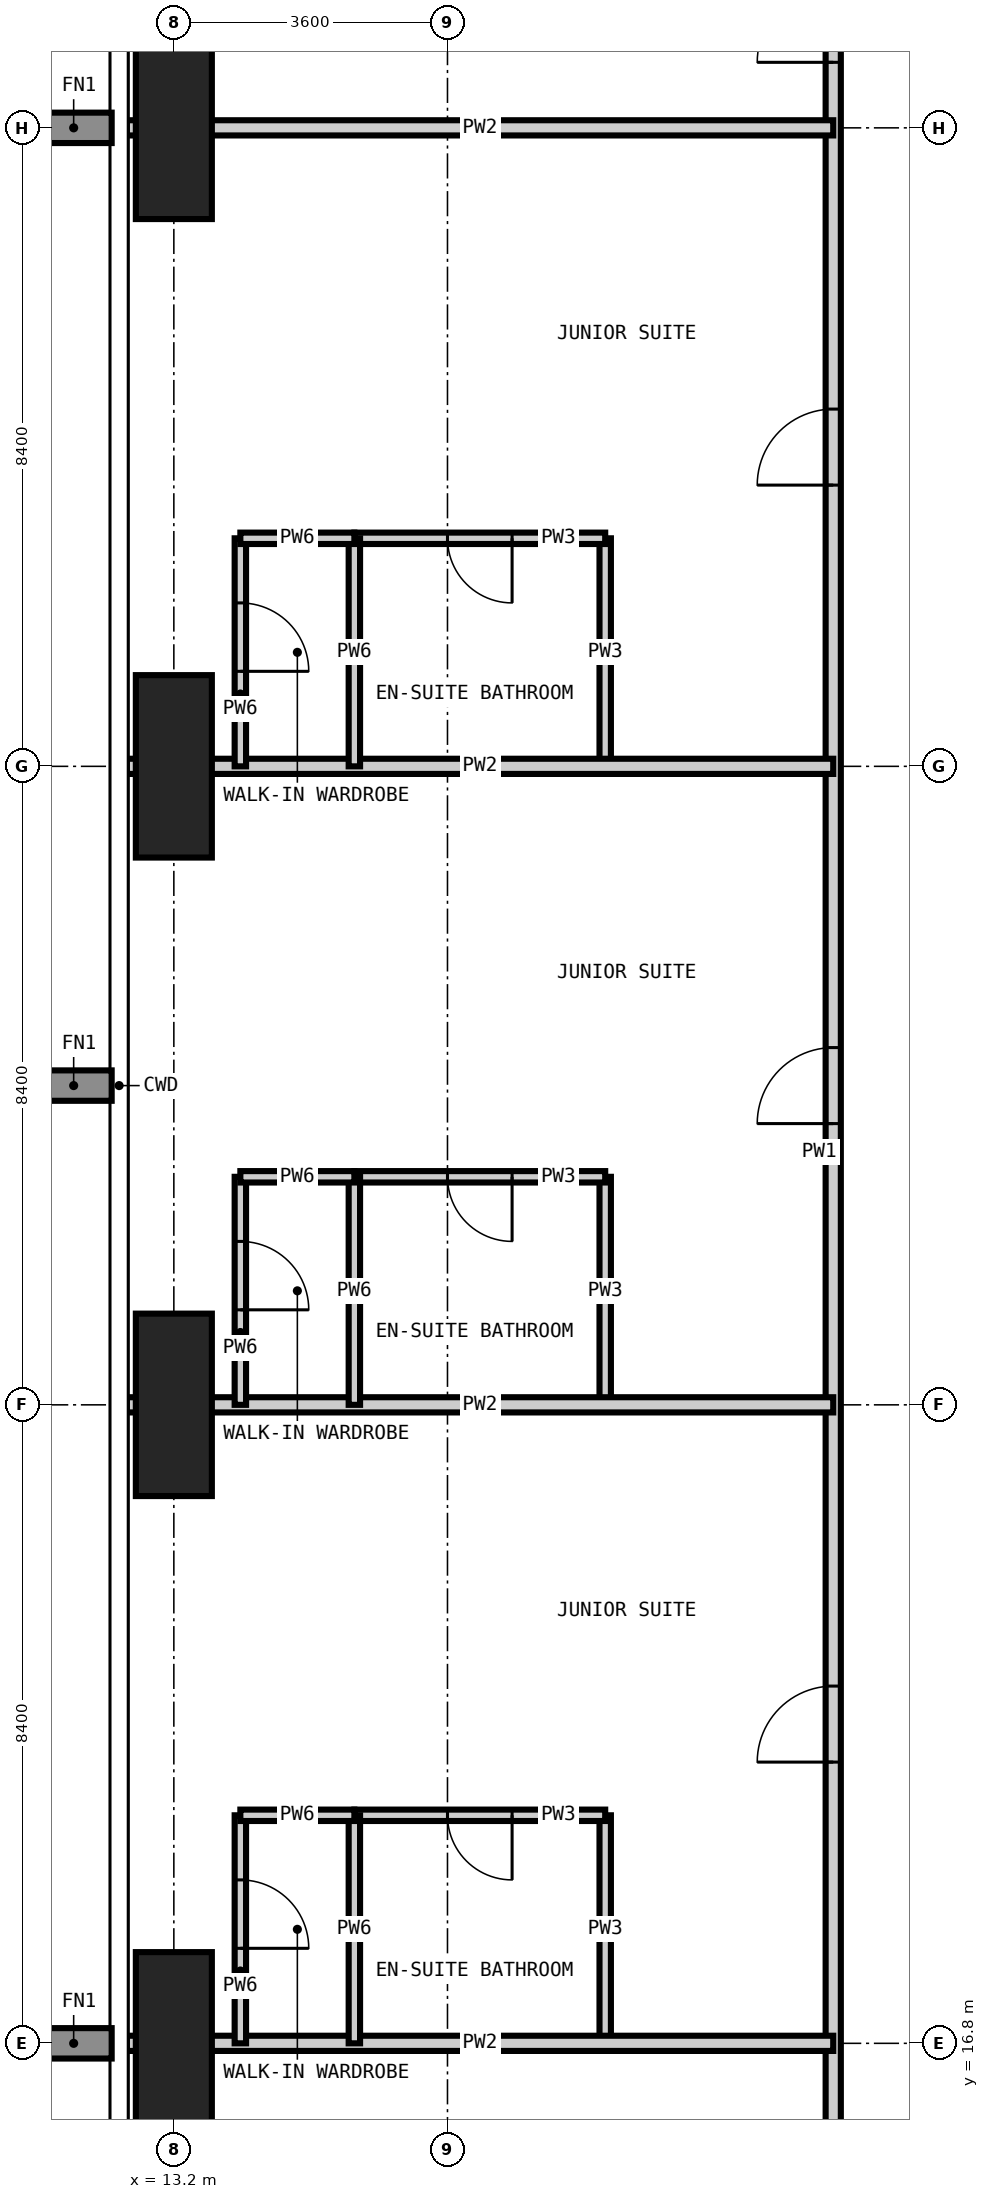
"""IFC4 building model, lengths in metres.
Left out: names, types, materials, properties, quantities, classifications, styles, units other than length and angle.
Written with IfcOpenShell. Run it as: python <this file> out.ifc"""

import sys

from ifc_helpers import new_model, si_unit, direction, frame, frame_2d, origin, origin_2d, place, context, subcontext, project, spatial, rectangle, extrude, element, fill, save


model = new_model("IFC4")
c1 = context("Model", 3, precision=1e-05, world=origin(), true_north=direction((0.0, 1.0)))
c2 = subcontext(c1, "Body", "Model", "MODEL_VIEW")
j1 = project(units=[si_unit("LENGTHUNIT", "METRE"), si_unit("PLANEANGLEUNIT", "RADIAN")], contexts=[c1])
p1 = place(None, origin())
s1 = spatial("IfcSite", under=j1, at=p1, CompositionType="ELEMENT")
p2 = place(p1, origin())
s2 = spatial("IfcBuilding", under=s1, at=p2, CompositionType="ELEMENT")
p3 = place(p2, frame((0.0, 0.0, 241.2)))
s3 = spatial("IfcBuildingStorey", under=s2, at=p3, CompositionType="ELEMENT", Elevation=241.2)
for number, where, z_axis, x_axis in (
    (1, (13.2, 16.8, -0.35), (0.0, 0.0, 1.0), (1.0, 0.0, 0.0)),
    (2, (13.2, 25.2, -0.35), (0.0, 0.0, 1.0), (1.0, 0.0, 0.0)),
    (3, (13.2, 33.6, -0.35), (0.0, 0.0, 1.0), (1.0, 0.0, 0.0)),
    (4, (13.2, 42.0, -0.35), (0.0, 0.0, 1.0), (1.0, 0.0, 0.0)),
):
    element("IfcColumn", number, at=place(p3, frame(where, z_axis=z_axis, x_axis=x_axis)), inside=s3, PredefinedType="COLUMN", context=c2, shape_type="SweptSolid", body=[
        extrude(rectangle(XDim=1.0, YDim=2.4, at=origin_2d()), origin(), (0.0, 0.0, 1.0), 3.9),
    ])
for number, where, z_axis, x_axis in (
    (5, (18.875, 16.8, 0.0), (0.0, 0.0, 1.0), (0.0, 1.0, 0.0)),
    (6, (18.875, 25.2, 0.0), (0.0, 0.0, 1.0), (0.0, 1.0, 0.0)),
    (7, (18.875, 33.6, 0.0), (0.0, 0.0, 1.0), (0.0, 1.0, 0.0)),
):
    element("IfcWall", number, at=place(p3, frame(where, z_axis=z_axis, x_axis=x_axis)), inside=s3, PredefinedType="PARTITIONING", context=c2, shape_type="SweptSolid", body=[
        extrude(rectangle(XDim=3.0, YDim=0.15, at=frame_2d((1.5, 0.0))), origin(), (0.0, 0.0, 1.0), 3.55),
    ])
p4 = place(p3, frame((15.575, 19.8, 0.0), z_axis=(0.0, 0.0, 1.0), x_axis=(1.0, 0.0, 0.0)))
e8 = element("IfcWall", 8, at=p4, inside=s3, PredefinedType="PARTITIONING", context=c2, shape_type="SweptSolid", body=[
    extrude(rectangle(XDim=3.3, YDim=0.15, at=frame_2d((1.65, 0.0))), origin(), (0.0, 0.0, 1.0), 3.55),
])
p5 = place(p4, frame((1.225, 0.0, 0.0)))
e9 = element("IfcOpeningElement", 9, at=p5, cuts=e8, PredefinedType="OPENING", context=c2, shape_type="SweptSolid", body=[
    extrude(rectangle(XDim=0.85, YDim=2.1, at=frame_2d((0.425, 1.05))), frame((0.0, 0.085, 0.0), z_axis=(0.0, -1.0, 0.0), x_axis=(1.0, 0.0, 0.0)), (0.0, 0.0, 1.0), 0.17),
])
p6 = place(p3, frame((15.575, 28.2, 0.0), z_axis=(0.0, 0.0, 1.0), x_axis=(1.0, 0.0, 0.0)))
e10 = element("IfcWall", 10, at=p6, inside=s3, PredefinedType="PARTITIONING", context=c2, shape_type="SweptSolid", body=[
    extrude(rectangle(XDim=3.3, YDim=0.15, at=frame_2d((1.65, 0.0))), origin(), (0.0, 0.0, 1.0), 3.55),
])
p7 = place(p6, frame((1.225, 0.0, 0.0)))
e11 = element("IfcOpeningElement", 11, at=p7, cuts=e10, PredefinedType="OPENING", context=c2, shape_type="SweptSolid", body=[
    extrude(rectangle(XDim=0.85, YDim=2.1, at=frame_2d((0.425, 1.05))), frame((0.0, 0.085, 0.0), z_axis=(0.0, -1.0, 0.0), x_axis=(1.0, 0.0, 0.0)), (0.0, 0.0, 1.0), 0.17),
])
p8 = place(p3, frame((15.575, 36.6, 0.0), z_axis=(0.0, 0.0, 1.0), x_axis=(1.0, 0.0, 0.0)))
e12 = element("IfcWall", 12, at=p8, inside=s3, PredefinedType="PARTITIONING", context=c2, shape_type="SweptSolid", body=[
    extrude(rectangle(XDim=3.3, YDim=0.15, at=frame_2d((1.65, 0.0))), origin(), (0.0, 0.0, 1.0), 3.55),
])
p9 = place(p8, frame((1.225, 0.0, 0.0)))
e13 = element("IfcOpeningElement", 13, at=p9, cuts=e12, PredefinedType="OPENING", context=c2, shape_type="SweptSolid", body=[
    extrude(rectangle(XDim=0.85, YDim=2.1, at=frame_2d((0.425, 1.05))), frame((0.0, 0.085, 0.0), z_axis=(0.0, -1.0, 0.0), x_axis=(1.0, 0.0, 0.0)), (0.0, 0.0, 1.0), 0.17),
])
p10 = place(p3, frame((21.875, 13.475, 0.0), z_axis=(0.0, 0.0, 1.0), x_axis=(0.0, 1.0, 0.0)))
e14 = element("IfcWall", 14, at=p10, inside=s3, PredefinedType="PARTITIONING", context=c2, shape_type="SweptSolid", body=[
    extrude(rectangle(XDim=31.25, YDim=0.2, at=frame_2d((15.625, 0.0))), origin(), (0.0, 0.0, 1.0), 3.55),
])
p11 = place(p10, frame((7.025, 0.0, 0.0)))
e15 = element("IfcOpeningElement", 15, at=p11, cuts=e14, PredefinedType="OPENING", context=c2, shape_type="SweptSolid", body=[
    extrude(rectangle(XDim=1.0, YDim=2.2, at=frame_2d((0.5, 1.1))), frame((0.0, 0.11, 0.0), z_axis=(0.0, -1.0, 0.0), x_axis=(1.0, 0.0, 0.0)), (0.0, 0.0, 1.0), 0.22),
])
p12 = place(p10, frame((15.425, 0.0, 0.0)))
e16 = element("IfcOpeningElement", 16, at=p12, cuts=e14, PredefinedType="OPENING", context=c2, shape_type="SweptSolid", body=[
    extrude(rectangle(XDim=1.0, YDim=2.2, at=frame_2d((0.5, 1.1))), frame((0.0, 0.11, 0.0), z_axis=(0.0, -1.0, 0.0), x_axis=(1.0, 0.0, 0.0)), (0.0, 0.0, 1.0), 0.22),
])
p13 = place(p10, frame((23.825, 0.0, 0.0)))
e17 = element("IfcOpeningElement", 17, at=p13, cuts=e14, PredefinedType="OPENING", context=c2, shape_type="SweptSolid", body=[
    extrude(rectangle(XDim=1.0, YDim=2.2, at=frame_2d((0.5, 1.1))), frame((0.0, 0.11, 0.0), z_axis=(0.0, -1.0, 0.0), x_axis=(1.0, 0.0, 0.0)), (0.0, 0.0, 1.0), 0.22),
])
p14 = place(p10, frame((1.162, 0.0, 0.0)))
e18 = element("IfcOpeningElement", 18, at=p14, cuts=e14, PredefinedType="OPENING", context=c2, shape_type="SweptSolid", body=[
    extrude(rectangle(XDim=1.0, YDim=2.2, at=frame_2d((0.5, 1.1))), frame((0.0, 0.11, 0.0), z_axis=(0.0, -1.0, 0.0), x_axis=(1.0, 0.0, 0.0)), (0.0, 0.0, 1.0), 0.22),
])
p15 = place(p10, frame((29.387, 0.0, 0.0)))
e19 = element("IfcOpeningElement", 19, at=p15, cuts=e14, PredefinedType="OPENING", context=c2, shape_type="SweptSolid", body=[
    extrude(rectangle(XDim=1.0, YDim=2.2, at=frame_2d((0.5, 1.1))), frame((0.0, 0.11, 0.0), z_axis=(0.0, -1.0, 0.0), x_axis=(1.0, 0.0, 0.0)), (0.0, 0.0, 1.0), 0.22),
])
for number, where, z_axis, x_axis in (
    (20, (12.582, 16.8, 0.0), (0.0, 0.0, 1.0), (1.0, 0.0, 0.0)),
    (21, (12.582, 25.2, 0.0), (0.0, 0.0, 1.0), (1.0, 0.0, 0.0)),
    (22, (12.582, 33.6, 0.0), (0.0, 0.0, 1.0), (1.0, 0.0, 0.0)),
    (23, (12.582, 42.0, 0.0), (0.0, 0.0, 1.0), (1.0, 0.0, 0.0)),
):
    element("IfcWall", number, at=place(p3, frame(where, z_axis=z_axis, x_axis=x_axis)), inside=s3, PredefinedType="PARTITIONING", context=c2, shape_type="SweptSolid", body=[
        extrude(rectangle(XDim=9.293, YDim=0.2, at=frame_2d((4.646, 0.0))), origin(), (0.0, 0.0, 1.0), 3.55),
    ])
p16 = place(p3, frame((14.075, 16.8, 0.0), z_axis=(0.0, 0.0, 1.0), x_axis=(0.0, 1.0, 0.0)))
e24 = element("IfcWall", 24, at=p16, inside=s3, PredefinedType="PARTITIONING", context=c2, shape_type="SweptSolid", body=[
    extrude(rectangle(XDim=3.0, YDim=0.15, at=frame_2d((1.5, 0.0))), origin(), (0.0, 0.0, 1.0), 3.55),
])
p17 = place(p16, frame((1.25, 0.0, 0.0)))
e25 = element("IfcOpeningElement", 25, at=p17, cuts=e24, PredefinedType="OPENING", context=c2, shape_type="SweptSolid", body=[
    extrude(rectangle(XDim=0.9, YDim=2.1, at=frame_2d((0.45, 1.05))), frame((0.0, 0.085, 0.0), z_axis=(0.0, -1.0, 0.0), x_axis=(1.0, 0.0, 0.0)), (0.0, 0.0, 1.0), 0.17),
])
p18 = place(p3, frame((14.075, 25.2, 0.0), z_axis=(0.0, 0.0, 1.0), x_axis=(0.0, 1.0, 0.0)))
e26 = element("IfcWall", 26, at=p18, inside=s3, PredefinedType="PARTITIONING", context=c2, shape_type="SweptSolid", body=[
    extrude(rectangle(XDim=3.0, YDim=0.15, at=frame_2d((1.5, 0.0))), origin(), (0.0, 0.0, 1.0), 3.55),
])
p19 = place(p18, frame((1.25, 0.0, 0.0)))
e27 = element("IfcOpeningElement", 27, at=p19, cuts=e26, PredefinedType="OPENING", context=c2, shape_type="SweptSolid", body=[
    extrude(rectangle(XDim=0.9, YDim=2.1, at=frame_2d((0.45, 1.05))), frame((0.0, 0.085, 0.0), z_axis=(0.0, -1.0, 0.0), x_axis=(1.0, 0.0, 0.0)), (0.0, 0.0, 1.0), 0.17),
])
p20 = place(p3, frame((14.075, 33.6, 0.0), z_axis=(0.0, 0.0, 1.0), x_axis=(0.0, 1.0, 0.0)))
e28 = element("IfcWall", 28, at=p20, inside=s3, PredefinedType="PARTITIONING", context=c2, shape_type="SweptSolid", body=[
    extrude(rectangle(XDim=3.0, YDim=0.15, at=frame_2d((1.5, 0.0))), origin(), (0.0, 0.0, 1.0), 3.55),
])
p21 = place(p20, frame((1.25, 0.0, 0.0)))
e29 = element("IfcOpeningElement", 29, at=p21, cuts=e28, PredefinedType="OPENING", context=c2, shape_type="SweptSolid", body=[
    extrude(rectangle(XDim=0.9, YDim=2.1, at=frame_2d((0.45, 1.05))), frame((0.0, 0.085, 0.0), z_axis=(0.0, -1.0, 0.0), x_axis=(1.0, 0.0, 0.0)), (0.0, 0.0, 1.0), 0.17),
])
for number, where, z_axis, x_axis in (
    (30, (15.575, 16.8, 0.0), (0.0, 0.0, 1.0), (0.0, 1.0, 0.0)),
    (31, (15.575, 25.2, 0.0), (0.0, 0.0, 1.0), (0.0, 1.0, 0.0)),
    (32, (15.575, 33.6, 0.0), (0.0, 0.0, 1.0), (0.0, 1.0, 0.0)),
):
    element("IfcWall", number, at=place(p3, frame(where, z_axis=z_axis, x_axis=x_axis)), inside=s3, PredefinedType="PARTITIONING", context=c2, shape_type="SweptSolid", body=[
        extrude(rectangle(XDim=3.0, YDim=0.15, at=frame_2d((1.5, 0.0))), origin(), (0.0, 0.0, 1.0), 3.55),
    ])
for number, where, z_axis, x_axis in (
    (33, (14.075, 19.8, 0.0), (0.0, 0.0, 1.0), (1.0, 0.0, 0.0)),
    (34, (14.075, 28.2, 0.0), (0.0, 0.0, 1.0), (1.0, 0.0, 0.0)),
    (35, (14.075, 36.6, 0.0), (0.0, 0.0, 1.0), (1.0, 0.0, 0.0)),
):
    element("IfcWall", number, at=place(p3, frame(where, z_axis=z_axis, x_axis=x_axis)), inside=s3, PredefinedType="PARTITIONING", context=c2, shape_type="SweptSolid", body=[
        extrude(rectangle(XDim=1.5, YDim=0.15, at=frame_2d((0.75, 0.0))), origin(), (0.0, 0.0, 1.0), 3.55),
    ])
p22 = place(p11, origin())
e36 = element("IfcDoor", 36, at=p22, inside=s3, OperationType="SINGLE_SWING_LEFT", PredefinedType="DOOR", context=c2, shape_type="SweptSolid", body=[
    extrude(rectangle(XDim=1.0, YDim=2.2, at=frame_2d((0.5, 1.1))), frame((0.0, 0.025, 0.0), z_axis=(0.0, -1.0, 0.0), x_axis=(1.0, 0.0, 0.0)), (0.0, 0.0, 1.0), 0.05),
])
fill(e15, e36)
p23 = place(p5, frame((0.85, 0.0, 0.0), z_axis=(0.0, 0.0, 1.0), x_axis=(-1.0, 0.0, 0.0)))
e37 = element("IfcDoor", 37, at=p23, inside=s3, OperationType="SINGLE_SWING_LEFT", PredefinedType="DOOR", context=c2, shape_type="SweptSolid", body=[
    extrude(rectangle(XDim=0.85, YDim=2.1, at=frame_2d((0.425, 1.05))), frame((0.0, 0.025, 0.0), z_axis=(0.0, -1.0, 0.0), x_axis=(1.0, 0.0, 0.0)), (0.0, 0.0, 1.0), 0.05),
])
fill(e9, e37)
p24 = place(p17, frame((0.9, 0.0, 0.0), z_axis=(0.0, 0.0, 1.0), x_axis=(-1.0, 0.0, 0.0)))
e38 = element("IfcDoor", 38, at=p24, inside=s3, OperationType="SINGLE_SWING_RIGHT", PredefinedType="DOOR", context=c2, shape_type="SweptSolid", body=[
    extrude(rectangle(XDim=0.9, YDim=2.1, at=frame_2d((0.45, 1.05))), frame((0.0, 0.025, 0.0), z_axis=(0.0, -1.0, 0.0), x_axis=(1.0, 0.0, 0.0)), (0.0, 0.0, 1.0), 0.05),
])
fill(e25, e38)
p25 = place(p12, origin())
e39 = element("IfcDoor", 39, at=p25, inside=s3, OperationType="SINGLE_SWING_LEFT", PredefinedType="DOOR", context=c2, shape_type="SweptSolid", body=[
    extrude(rectangle(XDim=1.0, YDim=2.2, at=frame_2d((0.5, 1.1))), frame((0.0, 0.025, 0.0), z_axis=(0.0, -1.0, 0.0), x_axis=(1.0, 0.0, 0.0)), (0.0, 0.0, 1.0), 0.05),
])
fill(e16, e39)
p26 = place(p7, frame((0.85, 0.0, 0.0), z_axis=(0.0, 0.0, 1.0), x_axis=(-1.0, 0.0, 0.0)))
e40 = element("IfcDoor", 40, at=p26, inside=s3, OperationType="SINGLE_SWING_LEFT", PredefinedType="DOOR", context=c2, shape_type="SweptSolid", body=[
    extrude(rectangle(XDim=0.85, YDim=2.1, at=frame_2d((0.425, 1.05))), frame((0.0, 0.025, 0.0), z_axis=(0.0, -1.0, 0.0), x_axis=(1.0, 0.0, 0.0)), (0.0, 0.0, 1.0), 0.05),
])
fill(e11, e40)
p27 = place(p19, frame((0.9, 0.0, 0.0), z_axis=(0.0, 0.0, 1.0), x_axis=(-1.0, 0.0, 0.0)))
e41 = element("IfcDoor", 41, at=p27, inside=s3, OperationType="SINGLE_SWING_RIGHT", PredefinedType="DOOR", context=c2, shape_type="SweptSolid", body=[
    extrude(rectangle(XDim=0.9, YDim=2.1, at=frame_2d((0.45, 1.05))), frame((0.0, 0.025, 0.0), z_axis=(0.0, -1.0, 0.0), x_axis=(1.0, 0.0, 0.0)), (0.0, 0.0, 1.0), 0.05),
])
fill(e27, e41)
p28 = place(p13, origin())
e42 = element("IfcDoor", 42, at=p28, inside=s3, OperationType="SINGLE_SWING_LEFT", PredefinedType="DOOR", context=c2, shape_type="SweptSolid", body=[
    extrude(rectangle(XDim=1.0, YDim=2.2, at=frame_2d((0.5, 1.1))), frame((0.0, 0.025, 0.0), z_axis=(0.0, -1.0, 0.0), x_axis=(1.0, 0.0, 0.0)), (0.0, 0.0, 1.0), 0.05),
])
fill(e17, e42)
p29 = place(p9, frame((0.85, 0.0, 0.0), z_axis=(0.0, 0.0, 1.0), x_axis=(-1.0, 0.0, 0.0)))
e43 = element("IfcDoor", 43, at=p29, inside=s3, OperationType="SINGLE_SWING_LEFT", PredefinedType="DOOR", context=c2, shape_type="SweptSolid", body=[
    extrude(rectangle(XDim=0.85, YDim=2.1, at=frame_2d((0.425, 1.05))), frame((0.0, 0.025, 0.0), z_axis=(0.0, -1.0, 0.0), x_axis=(1.0, 0.0, 0.0)), (0.0, 0.0, 1.0), 0.05),
])
fill(e13, e43)
p30 = place(p21, frame((0.9, 0.0, 0.0), z_axis=(0.0, 0.0, 1.0), x_axis=(-1.0, 0.0, 0.0)))
e44 = element("IfcDoor", 44, at=p30, inside=s3, OperationType="SINGLE_SWING_RIGHT", PredefinedType="DOOR", context=c2, shape_type="SweptSolid", body=[
    extrude(rectangle(XDim=0.9, YDim=2.1, at=frame_2d((0.45, 1.05))), frame((0.0, 0.025, 0.0), z_axis=(0.0, -1.0, 0.0), x_axis=(1.0, 0.0, 0.0)), (0.0, 0.0, 1.0), 0.05),
])
fill(e29, e44)
p31 = place(p15, origin())
e45 = element("IfcDoor", 45, at=p31, inside=s3, OperationType="SINGLE_SWING_LEFT", PredefinedType="DOOR", context=c2, shape_type="SweptSolid", body=[
    extrude(rectangle(XDim=1.0, YDim=2.2, at=frame_2d((0.5, 1.1))), frame((0.0, 0.025, 0.0), z_axis=(0.0, -1.0, 0.0), x_axis=(1.0, 0.0, 0.0)), (0.0, 0.0, 1.0), 0.05),
])
fill(e19, e45)
save(model, sys.argv[1])
